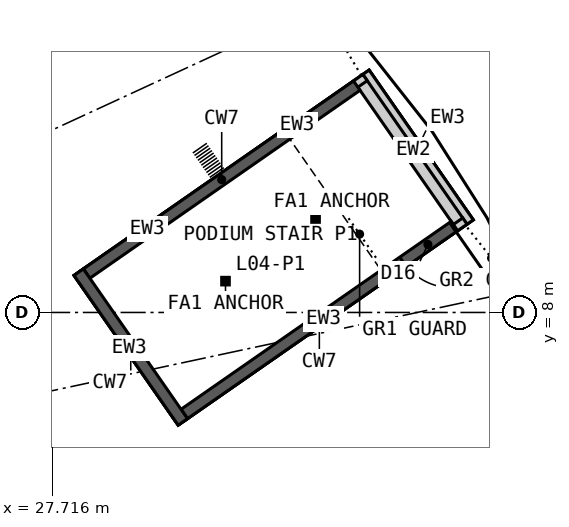
"""IFC4 building model, lengths in metres.
Left out: names, types, materials, properties, quantities, classifications, styles, units other than length and angle.
Written with IfcOpenShell. Run it as: python <this file> out.ifc"""

import sys

from ifc_helpers import new_model, si_unit, direction, frame, frame_2d, origin, place, context, subcontext, project, spatial, rectangle, extrude, element, fill, save


model = new_model("IFC4")
c1 = context("Model", 3, precision=1e-05, world=origin(), true_north=direction((0.0, 1.0)))
c2 = subcontext(c1, "Body", "Model", "MODEL_VIEW")
j1 = project(units=[si_unit("LENGTHUNIT", "METRE"), si_unit("PLANEANGLEUNIT", "RADIAN")], contexts=[c1])
p1 = place(None, origin())
s1 = spatial("IfcSite", under=j1, at=p1, CompositionType="ELEMENT")
p2 = place(p1, origin())
s2 = spatial("IfcBuilding", under=s1, at=p2, CompositionType="ELEMENT")
p3 = place(p2, frame((0.0, 0.0, 24.6)))
s3 = spatial("IfcBuildingStorey", under=s2, at=p3, CompositionType="ELEMENT", Elevation=24.6)
p4 = place(p3, frame((38.59, 10.293, 0.0), z_axis=(0.0, 0.0, 1.0), x_axis=(-0.571036173178, 0.820924898467, 0.0)))
e1 = element("IfcWall", 1, at=p4, inside=s3, PredefinedType="SOLIDWALL", context=c2, shape_type="SweptSolid", body=[
    extrude(rectangle(XDim=4.8, YDim=0.5, at=frame_2d((2.4, 0.0))), origin(), (0.0, 0.0, 1.0), 3.3),
])
p5 = place(p3, frame((38.713, 10.379, 3.5), z_axis=(0.0, 0.0, 1.0), x_axis=(-0.571036173178, 0.820924898467, 0.0)))
e2 = element("IfcWall", 2, at=p5, inside=s3, PredefinedType="PARAPET", context=c2, shape_type="SweptSolid", body=[
    extrude(rectangle(XDim=4.8, YDim=0.2, at=frame_2d((2.4, 0.0))), origin(), (0.0, 0.0, 1.0), 1.1),
])
p6 = place(p3, frame((35.947, 14.18, 3.5), z_axis=(0.0, 0.0, 1.0), x_axis=(-0.820934908624, -0.571021782248, 0.0)))
e3 = element("IfcWall", 3, at=p6, inside=s3, PredefinedType="PARAPET", context=c2, shape_type="SweptSolid", body=[
    extrude(rectangle(XDim=4.355, YDim=0.2, at=frame_2d((2.177, 0.0))), origin(), (0.0, 0.0, 1.0), 1.1),
])
p7 = place(p3, frame((31.921, 11.379, 3.5), z_axis=(0.0, 0.0, 1.0), x_axis=(-0.820931549203, -0.571026611922, 0.0)))
e4 = element("IfcWall", 4, at=p7, inside=s3, PredefinedType="PARAPET", context=c2, shape_type="SweptSolid", body=[
    extrude(rectangle(XDim=4.155, YDim=0.2, at=frame_2d((2.077, 0.0))), origin(), (0.0, 0.0, 1.0), 1.1),
])
p8 = place(p3, frame((28.37, 9.032, 3.5), z_axis=(0.0, 0.0, 1.0), x_axis=(0.571036173178, -0.820924898467, 0.0)))
e5 = element("IfcWall", 5, at=p8, inside=s3, PredefinedType="PARAPET", context=c2, shape_type="SweptSolid", body=[
    extrude(rectangle(XDim=4.8, YDim=0.2, at=frame_2d((2.4, 0.0))), origin(), (0.0, 0.0, 1.0), 1.1),
])
p9 = place(p3, frame((31.136, 5.23, 3.5), z_axis=(0.0, 0.0, 1.0), x_axis=(0.820922227988, 0.571040012254, 0.0)))
e6 = element("IfcWall", 6, at=p9, inside=s3, PredefinedType="PARAPET", context=c2, shape_type="SweptSolid", body=[
    extrude(rectangle(XDim=9.06, YDim=0.2, at=frame_2d((4.53, 0.0))), origin(), (0.0, 0.0, 1.0), 1.1),
])
p10 = place(p3, frame((38.299, 10.274, 0.0), z_axis=(0.0, 0.0, 1.0), x_axis=(-0.820936803751, -0.571019057692, 0.0)))
e7 = element("IfcWall", 7, at=p10, inside=s3, PredefinedType="SHEAR", context=c2, shape_type="SweptSolid", body=[
    extrude(rectangle(XDim=8.66, YDim=0.3, at=frame_2d((4.33, 0.0))), origin(), (0.0, 0.0, 1.0), 3.3),
])
p11 = place(p10, frame((0.05, 0.0, 0.0)))
e8 = element("IfcOpeningElement", 8, at=p11, cuts=e7, PredefinedType="OPENING", context=c2, shape_type="SweptSolid", body=[
    extrude(rectangle(XDim=1.6, YDim=2.1, at=frame_2d((0.8, 1.05))), frame((0.0, 0.16, 0.0), z_axis=(0.0, -1.0, 0.0), x_axis=(1.0, 0.0, 0.0)), (0.0, 0.0, 1.0), 0.32),
])
p12 = place(p3, frame((35.729, 13.968, 0.0), z_axis=(0.0, 0.0, 1.0), x_axis=(-0.82092761123, -0.571032273274, 0.0)))
e9 = element("IfcWall", 9, at=p12, inside=s3, PredefinedType="SHEAR", context=c2, shape_type="SweptSolid", body=[
    extrude(rectangle(XDim=8.66, YDim=0.3, at=frame_2d((4.33, 0.0))), origin(), (0.0, 0.0, 1.0), 3.3),
])
p13 = place(p3, frame((31.153, 5.12, 0.0), z_axis=(0.0, 0.0, 1.0), x_axis=(-0.571036173178, 0.820924898467, 0.0)))
e10 = element("IfcWall", 10, at=p13, inside=s3, PredefinedType="SHEAR", context=c2, shape_type="SweptSolid", body=[
    extrude(rectangle(XDim=4.8, YDim=0.3, at=frame_2d((2.4, 0.0))), origin(), (0.0, 0.0, 1.0), 3.3),
])
p14 = place(p11, origin())
e11 = element("IfcDoor", 11, at=p14, inside=s3, OperationType="SINGLE_SWING_LEFT", PredefinedType="DOOR", context=c2, shape_type="SweptSolid", body=[
    extrude(rectangle(XDim=1.6, YDim=2.1, at=frame_2d((0.8, 1.05))), frame((0.0, 0.025, 0.0), z_axis=(0.0, -1.0, 0.0), x_axis=(1.0, 0.0, 0.0)), (0.0, 0.0, 1.0), 0.05),
])
fill(e8, e11)
save(model, sys.argv[1])
